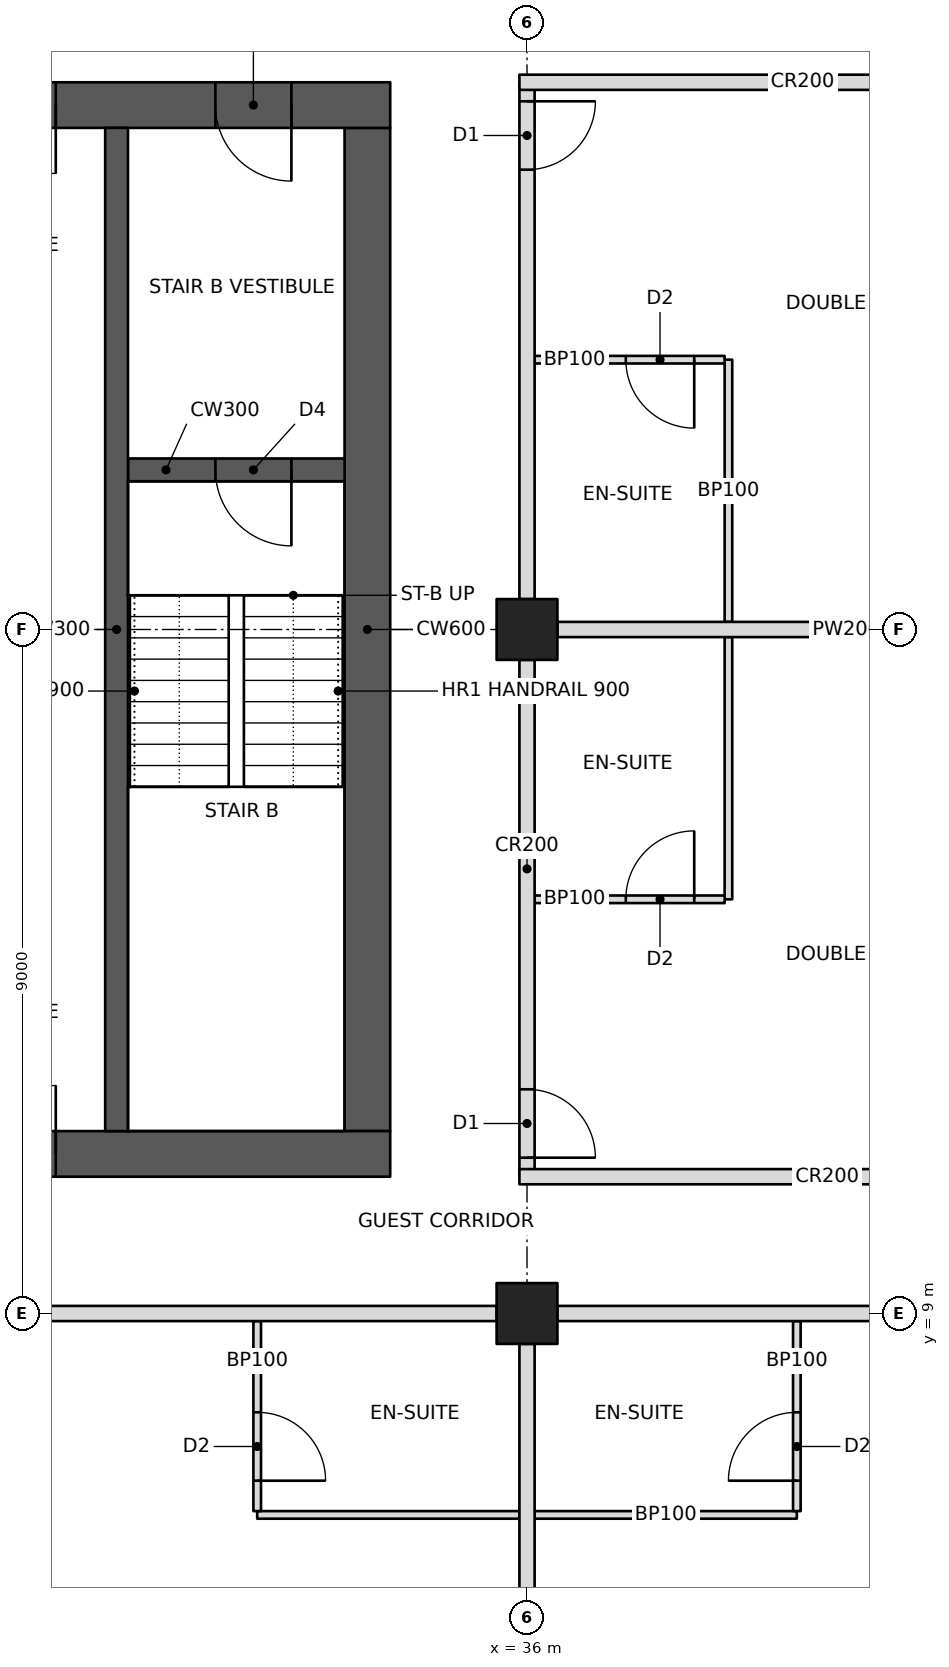
"""IFC4 building model, lengths in metres.
Left out: names, types, materials, properties, quantities, classifications, styles, units other than length and angle.
Written with IfcOpenShell. Run it as: python <this file> out.ifc"""

import sys

from ifc_helpers import new_model, si_unit, direction, frame, frame_2d, origin, origin_2d, place, context, subcontext, project, spatial, rectangle, hollow_rectangle, extrude, element, fill, save


model = new_model("IFC4")
c1 = context("Model", 3, precision=1e-05, world=origin(), true_north=direction((0.0, 1.0)))
c2 = subcontext(c1, "Body", "Model", "MODEL_VIEW")
j1 = project(units=[si_unit("LENGTHUNIT", "METRE"), si_unit("PLANEANGLEUNIT", "RADIAN")], contexts=[c1])
p1 = place(None, origin())
s1 = spatial("IfcSite", under=j1, at=p1, CompositionType="ELEMENT")
p2 = place(p1, origin())
s2 = spatial("IfcBuilding", under=s1, at=p2, CompositionType="ELEMENT")
p3 = place(p2, frame((0.0, 0.0, 184.2)))
s3 = spatial("IfcBuildingStorey", under=s2, at=p3, CompositionType="ELEMENT", Elevation=184.2)
for number, where, z_axis, x_axis in (
    (1, (36.0, 9.0, 0.0), (0.0, 0.0, 1.0), (0.0, 1.0, 0.0)),
    (2, (36.0, 18.0, 0.0), (0.0, 0.0, 1.0), (0.0, 1.0, 0.0)),
):
    element("IfcColumn", number, at=place(p3, frame(where, z_axis=z_axis, x_axis=x_axis)), inside=s3, PredefinedType="COLUMN", context=c2, shape_type="SweptSolid", body=[
        extrude(hollow_rectangle(XDim=0.8, YDim=0.8, WallThickness=0.06, at=origin_2d()), origin(), (0.0, 0.0, 1.0), 3.4),
    ])
p4 = place(p3, frame((10.8, 11.1, 0.0), z_axis=(0.0, 0.0, 1.0), x_axis=(1.0, 0.0, 0.0)))
e3 = element("IfcWall", 3, at=p4, inside=s3, PredefinedType="SHEAR", context=c2, shape_type="SweptSolid", body=[
    extrude(rectangle(XDim=23.4, YDim=0.6, at=frame_2d((11.7, 0.0))), origin(), (0.0, 0.0, 1.0), 3.4),
])
p5 = place(p4, frame((1.0, 0.0, 0.0)))
e4 = element("IfcOpeningElement", 4, at=p5, cuts=e3, PredefinedType="OPENING", context=c2, shape_type="SweptSolid", body=[
    extrude(rectangle(XDim=1.0, YDim=2.1, at=frame_2d((0.5, 1.05))), frame((0.0, 0.31, 0.0), z_axis=(0.0, -1.0, 0.0), x_axis=(1.0, 0.0, 0.0)), (0.0, 0.0, 1.0), 0.62),
])
p6 = place(p4, frame((17.2, 0.0, 0.0)))
e5 = element("IfcOpeningElement", 5, at=p6, cuts=e3, PredefinedType="OPENING", context=c2, shape_type="SweptSolid", body=[
    extrude(rectangle(XDim=1.8, YDim=2.1, at=frame_2d((0.9, 1.05))), frame((0.0, 0.31, 0.0), z_axis=(0.0, -1.0, 0.0), x_axis=(1.0, 0.0, 0.0)), (0.0, 0.0, 1.0), 0.62),
])
p7 = place(p3, frame((10.8, 24.9, 0.0), z_axis=(0.0, 0.0, 1.0), x_axis=(1.0, 0.0, 0.0)))
e6 = element("IfcWall", 6, at=p7, inside=s3, PredefinedType="SHEAR", context=c2, shape_type="SweptSolid", body=[
    extrude(rectangle(XDim=23.4, YDim=0.6, at=frame_2d((11.7, 0.0))), origin(), (0.0, 0.0, 1.0), 3.4),
])
p8 = place(p7, frame((17.2, 0.0, 0.0)))
e7 = element("IfcOpeningElement", 7, at=p8, cuts=e6, PredefinedType="OPENING", context=c2, shape_type="SweptSolid", body=[
    extrude(rectangle(XDim=1.8, YDim=2.1, at=frame_2d((0.9, 1.05))), frame((0.0, 0.31, 0.0), z_axis=(0.0, -1.0, 0.0), x_axis=(1.0, 0.0, 0.0)), (0.0, 0.0, 1.0), 0.62),
])
p9 = place(p7, frame((21.1, 0.0, 0.0)))
e8 = element("IfcOpeningElement", 8, at=p9, cuts=e6, PredefinedType="OPENING", context=c2, shape_type="SweptSolid", body=[
    extrude(rectangle(XDim=1.0, YDim=2.1, at=frame_2d((0.5, 1.05))), frame((0.0, 0.31, 0.0), z_axis=(0.0, -1.0, 0.0), x_axis=(1.0, 0.0, 0.0)), (0.0, 0.0, 1.0), 0.62),
])
p10 = place(p7, frame((4.9, 0.0, 0.0)))
e9 = element("IfcOpeningElement", 9, at=p10, cuts=e6, PredefinedType="OPENING", context=c2, shape_type="SweptSolid", body=[
    extrude(rectangle(XDim=1.0, YDim=2.1, at=frame_2d((0.5, 1.05))), frame((0.0, 0.31, 0.0), z_axis=(0.0, -1.0, 0.0), x_axis=(1.0, 0.0, 0.0)), (0.0, 0.0, 1.0), 0.62),
])
p11 = place(p3, frame((33.9, 11.4, 0.0), z_axis=(0.0, 0.0, 1.0), x_axis=(0.0, 1.0, 0.0)))
e10 = element("IfcWall", 10, at=p11, inside=s3, PredefinedType="SHEAR", context=c2, shape_type="SweptSolid", body=[
    extrude(rectangle(XDim=13.2, YDim=0.6, at=frame_2d((6.6, 0.0))), origin(), (0.0, 0.0, 1.0), 3.4),
])
p12 = place(p3, frame((30.6, 11.4, 0.0), z_axis=(0.0, 0.0, 1.0), x_axis=(0.0, 1.0, 0.0)))
e11 = element("IfcWall", 11, at=p12, inside=s3, PredefinedType="SHEAR", context=c2, shape_type="SweptSolid", body=[
    extrude(rectangle(XDim=13.2, YDim=0.3, at=frame_2d((6.6, 0.0))), origin(), (0.0, 0.0, 1.0), 3.4),
])
p13 = place(p3, frame((30.75, 20.1, 0.0), z_axis=(0.0, 0.0, 1.0), x_axis=(1.0, 0.0, 0.0)))
e12 = element("IfcWall", 12, at=p13, inside=s3, PredefinedType="SHEAR", context=c2, shape_type="SweptSolid", body=[
    extrude(rectangle(XDim=2.85, YDim=0.3, at=frame_2d((1.425, 0.0))), origin(), (0.0, 0.0, 1.0), 3.4),
])
p14 = place(p13, frame((1.15, 0.0, 0.0)))
e13 = element("IfcOpeningElement", 13, at=p14, cuts=e12, PredefinedType="OPENING", context=c2, shape_type="SweptSolid", body=[
    extrude(rectangle(XDim=1.0, YDim=2.1, at=frame_2d((0.5, 1.05))), frame((0.0, 0.16, 0.0), z_axis=(0.0, -1.0, 0.0), x_axis=(1.0, 0.0, 0.0)), (0.0, 0.0, 1.0), 0.32),
])
p15 = place(p3, frame((27.4, 9.0, 0.0), z_axis=(0.0, 0.0, 1.0), x_axis=(1.0, 0.0, 0.0)))
e14 = element("IfcWall", 14, at=p15, inside=s3, PredefinedType="PARTITIONING", context=c2, shape_type="SweptSolid", body=[
    extrude(rectangle(XDim=8.2, YDim=0.2, at=frame_2d((4.1, 0.0))), origin(), (0.0, 0.0, 1.0), 2.405),
])
p16 = place(p15, frame((0.15, 0.0, 0.0)))
e15 = element("IfcOpeningElement", 15, at=p16, cuts=e14, PredefinedType="OPENING", context=c2, shape_type="SweptSolid", body=[
    extrude(rectangle(XDim=0.9, YDim=2.1, at=frame_2d((0.45, 1.05))), frame((0.0, 0.11, 0.0), z_axis=(0.0, -1.0, 0.0), x_axis=(1.0, 0.0, 0.0)), (0.0, 0.0, 1.0), 0.22),
])
p17 = place(p3, frame((36.4, 9.0, 0.0), z_axis=(0.0, 0.0, 1.0), x_axis=(1.0, 0.0, 0.0)))
e16 = element("IfcWall", 16, at=p17, inside=s3, PredefinedType="PARTITIONING", context=c2, shape_type="SweptSolid", body=[
    extrude(rectangle(XDim=7.6, YDim=0.2, at=frame_2d((3.8, 0.0))), origin(), (0.0, 0.0, 1.0), 2.438),
])
p18 = place(p17, frame((6.45, 0.0, 0.0)))
e17 = element("IfcOpeningElement", 17, at=p18, cuts=e16, PredefinedType="OPENING", context=c2, shape_type="SweptSolid", body=[
    extrude(rectangle(XDim=0.9, YDim=2.1, at=frame_2d((0.45, 1.05))), frame((0.0, 0.11, 0.0), z_axis=(0.0, -1.0, 0.0), x_axis=(1.0, 0.0, 0.0)), (0.0, 0.0, 1.0), 0.22),
])
p19 = place(p3, frame((36.0, 10.8, 0.0), z_axis=(0.0, 0.0, 1.0), x_axis=(0.0, 1.0, 0.0)))
e18 = element("IfcWall", 18, at=p19, inside=s3, PredefinedType="PARTITIONING", context=c2, shape_type="SweptSolid", body=[
    extrude(rectangle(XDim=6.8, YDim=0.2, at=frame_2d((3.4, 0.0))), origin(), (0.0, 0.0, 1.0), 2.405),
])
p20 = place(p19, frame((0.25, 0.0, 0.0)))
e19 = element("IfcOpeningElement", 19, at=p20, cuts=e18, PredefinedType="OPENING", context=c2, shape_type="SweptSolid", body=[
    extrude(rectangle(XDim=0.9, YDim=2.1, at=frame_2d((0.45, 1.05))), frame((0.0, 0.11, 0.0), z_axis=(0.0, -1.0, 0.0), x_axis=(1.0, 0.0, 0.0)), (0.0, 0.0, 1.0), 0.22),
])
p21 = place(p3, frame((36.0, 18.4, 0.0), z_axis=(0.0, 0.0, 1.0), x_axis=(0.0, 1.0, 0.0)))
e20 = element("IfcWall", 20, at=p21, inside=s3, PredefinedType="PARTITIONING", context=c2, shape_type="SweptSolid", body=[
    extrude(rectangle(XDim=6.8, YDim=0.2, at=frame_2d((3.4, 0.0))), origin(), (0.0, 0.0, 1.0), 2.405),
])
p22 = place(p21, frame((5.65, 0.0, 0.0)))
e21 = element("IfcOpeningElement", 21, at=p22, cuts=e20, PredefinedType="OPENING", context=c2, shape_type="SweptSolid", body=[
    extrude(rectangle(XDim=0.9, YDim=2.1, at=frame_2d((0.45, 1.05))), frame((0.0, 0.11, 0.0), z_axis=(0.0, -1.0, 0.0), x_axis=(1.0, 0.0, 0.0)), (0.0, 0.0, 1.0), 0.22),
])
p23 = place(p3, frame((35.9, 10.8, 0.0), z_axis=(0.0, 0.0, 1.0), x_axis=(1.0, 0.0, 0.0)))
e22 = element("IfcWall", 22, at=p23, inside=s3, PredefinedType="PARTITIONING", context=c2, shape_type="SweptSolid", body=[
    extrude(rectangle(XDim=8.1, YDim=0.2, at=frame_2d((4.05, 0.0))), origin(), (0.0, 0.0, 1.0), 2.404),
])
p24 = place(p3, frame((35.9, 25.2, 0.0), z_axis=(0.0, 0.0, 1.0), x_axis=(1.0, 0.0, 0.0)))
e23 = element("IfcWall", 23, at=p24, inside=s3, PredefinedType="PARTITIONING", context=c2, shape_type="SweptSolid", body=[
    extrude(rectangle(XDim=7.45, YDim=0.2, at=frame_2d((3.725, 0.0))), origin(), (0.0, 0.0, 1.0), 2.404),
])
p25 = place(p3, frame((36.0, 8.6, 0.0), z_axis=(0.0, 0.0, 1.0), x_axis=(0.0, -1.0, 0.0)))
e24 = element("IfcWall", 24, at=p25, inside=s3, PredefinedType="PARTITIONING", context=c2, shape_type="SweptSolid", body=[
    extrude(rectangle(XDim=7.6, YDim=0.2, at=frame_2d((3.8, 0.0))), origin(), (0.0, 0.0, 1.0), 2.438),
])
p26 = place(p3, frame((32.45, 6.35, 0.0), z_axis=(0.0, 0.0, 1.0), x_axis=(1.0, 0.0, 0.0)))
e25 = element("IfcWall", 25, at=p26, inside=s3, PredefinedType="PARTITIONING", context=c2, shape_type="SweptSolid", body=[
    extrude(rectangle(XDim=3.45, YDim=0.1, at=frame_2d((1.725, 0.0))), origin(), (0.0, 0.0, 1.0), 2.438),
])
p27 = place(p3, frame((32.45, 8.9, 0.0), z_axis=(0.0, 0.0, 1.0), x_axis=(0.0, -1.0, 0.0)))
e26 = element("IfcWall", 26, at=p27, inside=s3, PredefinedType="PARTITIONING", context=c2, shape_type="SweptSolid", body=[
    extrude(rectangle(XDim=2.5, YDim=0.1, at=frame_2d((1.25, 0.0))), origin(), (0.0, 0.0, 1.0), 2.404),
])
p28 = place(p27, frame((1.2, 0.0, 0.0)))
e27 = element("IfcOpeningElement", 27, at=p28, cuts=e26, PredefinedType="OPENING", context=c2, shape_type="SweptSolid", body=[
    extrude(rectangle(XDim=0.9, YDim=2.1, at=frame_2d((0.45, 1.05))), frame((0.0, 0.06, 0.0), z_axis=(0.0, -1.0, 0.0), x_axis=(1.0, 0.0, 0.0)), (0.0, 0.0, 1.0), 0.12),
])
p29 = place(p3, frame((36.1, 6.35, 0.0), z_axis=(0.0, 0.0, 1.0), x_axis=(1.0, 0.0, 0.0)))
e28 = element("IfcWall", 28, at=p29, inside=s3, PredefinedType="PARTITIONING", context=c2, shape_type="SweptSolid", body=[
    extrude(rectangle(XDim=3.45, YDim=0.1, at=frame_2d((1.725, 0.0))), origin(), (0.0, 0.0, 1.0), 2.438),
])
p30 = place(p3, frame((39.55, 8.9, 0.0), z_axis=(0.0, 0.0, 1.0), x_axis=(0.0, -1.0, 0.0)))
e29 = element("IfcWall", 29, at=p30, inside=s3, PredefinedType="PARTITIONING", context=c2, shape_type="SweptSolid", body=[
    extrude(rectangle(XDim=2.5, YDim=0.1, at=frame_2d((1.25, 0.0))), origin(), (0.0, 0.0, 1.0), 2.438),
])
p31 = place(p30, frame((1.2, 0.0, 0.0)))
e30 = element("IfcOpeningElement", 30, at=p31, cuts=e29, PredefinedType="OPENING", context=c2, shape_type="SweptSolid", body=[
    extrude(rectangle(XDim=0.9, YDim=2.1, at=frame_2d((0.45, 1.05))), frame((0.0, 0.06, 0.0), z_axis=(0.0, -1.0, 0.0), x_axis=(1.0, 0.0, 0.0)), (0.0, 0.0, 1.0), 0.12),
])
p32 = place(p3, frame((36.4, 18.0, 0.0), z_axis=(0.0, 0.0, 1.0), x_axis=(1.0, 0.0, 0.0)))
e31 = element("IfcWall", 31, at=p32, inside=s3, PredefinedType="PARTITIONING", context=c2, shape_type="SweptSolid", body=[
    extrude(rectangle(XDim=7.6, YDim=0.2, at=frame_2d((3.8, 0.0))), origin(), (0.0, 0.0, 1.0), 2.405),
])
p33 = place(p3, frame((38.65, 14.45, 0.0), z_axis=(0.0, 0.0, 1.0), x_axis=(0.0, 1.0, 0.0)))
e32 = element("IfcWall", 32, at=p33, inside=s3, PredefinedType="PARTITIONING", context=c2, shape_type="SweptSolid", body=[
    extrude(rectangle(XDim=3.45, YDim=0.1, at=frame_2d((1.725, 0.0))), origin(), (0.0, 0.0, 1.0), 2.404),
])
p34 = place(p3, frame((36.1, 14.45, 0.0), z_axis=(0.0, 0.0, 1.0), x_axis=(1.0, 0.0, 0.0)))
e33 = element("IfcWall", 33, at=p34, inside=s3, PredefinedType="PARTITIONING", context=c2, shape_type="SweptSolid", body=[
    extrude(rectangle(XDim=2.5, YDim=0.1, at=frame_2d((1.25, 0.0))), origin(), (0.0, 0.0, 1.0), 2.404),
])
p35 = place(p34, frame((1.2, 0.0, 0.0)))
e34 = element("IfcOpeningElement", 34, at=p35, cuts=e33, PredefinedType="OPENING", context=c2, shape_type="SweptSolid", body=[
    extrude(rectangle(XDim=0.9, YDim=2.1, at=frame_2d((0.45, 1.05))), frame((0.0, 0.06, 0.0), z_axis=(0.0, -1.0, 0.0), x_axis=(1.0, 0.0, 0.0)), (0.0, 0.0, 1.0), 0.12),
])
p36 = place(p3, frame((38.65, 18.1, 0.0), z_axis=(0.0, 0.0, 1.0), x_axis=(0.0, 1.0, 0.0)))
e35 = element("IfcWall", 35, at=p36, inside=s3, PredefinedType="PARTITIONING", context=c2, shape_type="SweptSolid", body=[
    extrude(rectangle(XDim=3.45, YDim=0.1, at=frame_2d((1.725, 0.0))), origin(), (0.0, 0.0, 1.0), 2.404),
])
p37 = place(p3, frame((36.1, 21.55, 0.0), z_axis=(0.0, 0.0, 1.0), x_axis=(1.0, 0.0, 0.0)))
e36 = element("IfcWall", 36, at=p37, inside=s3, PredefinedType="PARTITIONING", context=c2, shape_type="SweptSolid", body=[
    extrude(rectangle(XDim=2.5, YDim=0.1, at=frame_2d((1.25, 0.0))), origin(), (0.0, 0.0, 1.0), 2.404),
])
p38 = place(p37, frame((1.2, 0.0, 0.0)))
e37 = element("IfcOpeningElement", 37, at=p38, cuts=e36, PredefinedType="OPENING", context=c2, shape_type="SweptSolid", body=[
    extrude(rectangle(XDim=0.9, YDim=2.1, at=frame_2d((0.45, 1.05))), frame((0.0, 0.06, 0.0), z_axis=(0.0, -1.0, 0.0), x_axis=(1.0, 0.0, 0.0)), (0.0, 0.0, 1.0), 0.12),
])
p39 = place(p28, origin())
e38 = element("IfcDoor", 38, at=p39, inside=s3, OperationType="SINGLE_SWING_RIGHT", PredefinedType="DOOR", context=c2, shape_type="SweptSolid", body=[
    extrude(rectangle(XDim=0.9, YDim=2.1, at=frame_2d((0.45, 1.05))), frame((0.0, 0.025, 0.0), z_axis=(0.0, -1.0, 0.0), x_axis=(1.0, 0.0, 0.0)), (0.0, 0.0, 1.0), 0.05),
])
fill(e27, e38)
p40 = place(p31, frame((0.9, 0.0, 0.0), z_axis=(0.0, 0.0, 1.0), x_axis=(-1.0, 0.0, 0.0)))
e39 = element("IfcDoor", 39, at=p40, inside=s3, OperationType="SINGLE_SWING_LEFT", PredefinedType="DOOR", context=c2, shape_type="SweptSolid", body=[
    extrude(rectangle(XDim=0.9, YDim=2.1, at=frame_2d((0.45, 1.05))), frame((0.0, 0.025, 0.0), z_axis=(0.0, -1.0, 0.0), x_axis=(1.0, 0.0, 0.0)), (0.0, 0.0, 1.0), 0.05),
])
fill(e30, e39)
p41 = place(p35, origin())
e40 = element("IfcDoor", 40, at=p41, inside=s3, OperationType="SINGLE_SWING_RIGHT", PredefinedType="DOOR", context=c2, shape_type="SweptSolid", body=[
    extrude(rectangle(XDim=0.9, YDim=2.1, at=frame_2d((0.45, 1.05))), frame((0.0, 0.025, 0.0), z_axis=(0.0, -1.0, 0.0), x_axis=(1.0, 0.0, 0.0)), (0.0, 0.0, 1.0), 0.05),
])
fill(e34, e40)
p42 = place(p20, frame((0.9, 0.0, 0.0), z_axis=(0.0, 0.0, 1.0), x_axis=(-1.0, 0.0, 0.0)))
e41 = element("IfcDoor", 41, at=p42, inside=s3, OperationType="SINGLE_SWING_RIGHT", PredefinedType="DOOR", context=c2, shape_type="SweptSolid", body=[
    extrude(rectangle(XDim=0.9, YDim=2.1, at=frame_2d((0.45, 1.05))), frame((0.0, 0.025, 0.0), z_axis=(0.0, -1.0, 0.0), x_axis=(1.0, 0.0, 0.0)), (0.0, 0.0, 1.0), 0.05),
])
fill(e19, e41)
p43 = place(p38, frame((0.9, 0.0, 0.0), z_axis=(0.0, 0.0, 1.0), x_axis=(-1.0, 0.0, 0.0)))
e42 = element("IfcDoor", 42, at=p43, inside=s3, OperationType="SINGLE_SWING_LEFT", PredefinedType="DOOR", context=c2, shape_type="SweptSolid", body=[
    extrude(rectangle(XDim=0.9, YDim=2.1, at=frame_2d((0.45, 1.05))), frame((0.0, 0.025, 0.0), z_axis=(0.0, -1.0, 0.0), x_axis=(1.0, 0.0, 0.0)), (0.0, 0.0, 1.0), 0.05),
])
fill(e37, e42)
p44 = place(p22, frame((0.9, 0.0, 0.0), z_axis=(0.0, 0.0, 1.0), x_axis=(-1.0, 0.0, 0.0)))
e43 = element("IfcDoor", 43, at=p44, inside=s3, OperationType="SINGLE_SWING_LEFT", PredefinedType="DOOR", context=c2, shape_type="SweptSolid", body=[
    extrude(rectangle(XDim=0.9, YDim=2.1, at=frame_2d((0.45, 1.05))), frame((0.0, 0.025, 0.0), z_axis=(0.0, -1.0, 0.0), x_axis=(1.0, 0.0, 0.0)), (0.0, 0.0, 1.0), 0.05),
])
fill(e21, e43)
p45 = place(p6, origin())
e44 = element("IfcDoor", 44, at=p45, inside=s3, OperationType="DOUBLE_DOOR_SINGLE_SWING", PredefinedType="DOOR", context=c2, shape_type="SweptSolid", body=[
    extrude(rectangle(XDim=1.8, YDim=2.1, at=frame_2d((0.9, 1.05))), frame((0.0, 0.025, 0.0), z_axis=(0.0, -1.0, 0.0), x_axis=(1.0, 0.0, 0.0)), (0.0, 0.0, 1.0), 0.05),
])
fill(e5, e44)
p46 = place(p8, frame((1.8, 0.0, 0.0), z_axis=(0.0, 0.0, 1.0), x_axis=(-1.0, 0.0, 0.0)))
e45 = element("IfcDoor", 45, at=p46, inside=s3, OperationType="DOUBLE_DOOR_SINGLE_SWING", PredefinedType="DOOR", context=c2, shape_type="SweptSolid", body=[
    extrude(rectangle(XDim=1.8, YDim=2.1, at=frame_2d((0.9, 1.05))), frame((0.0, 0.025, 0.0), z_axis=(0.0, -1.0, 0.0), x_axis=(1.0, 0.0, 0.0)), (0.0, 0.0, 1.0), 0.05),
])
fill(e7, e45)
p47 = place(p9, frame((1.0, 0.0, 0.0), z_axis=(0.0, 0.0, 1.0), x_axis=(-1.0, 0.0, 0.0)))
e46 = element("IfcDoor", 46, at=p47, inside=s3, OperationType="SINGLE_SWING_LEFT", PredefinedType="DOOR", context=c2, shape_type="SweptSolid", body=[
    extrude(rectangle(XDim=1.0, YDim=2.1, at=frame_2d((0.5, 1.05))), frame((0.0, 0.025, 0.0), z_axis=(0.0, -1.0, 0.0), x_axis=(1.0, 0.0, 0.0)), (0.0, 0.0, 1.0), 0.05),
])
fill(e8, e46)
p48 = place(p14, frame((1.0, 0.0, 0.0), z_axis=(0.0, 0.0, 1.0), x_axis=(-1.0, 0.0, 0.0)))
e47 = element("IfcDoor", 47, at=p48, inside=s3, OperationType="SINGLE_SWING_LEFT", PredefinedType="DOOR", context=c2, shape_type="SweptSolid", body=[
    extrude(rectangle(XDim=1.0, YDim=2.1, at=frame_2d((0.5, 1.05))), frame((0.0, 0.025, 0.0), z_axis=(0.0, -1.0, 0.0), x_axis=(1.0, 0.0, 0.0)), (0.0, 0.0, 1.0), 0.05),
])
fill(e13, e47)
save(model, sys.argv[1])
